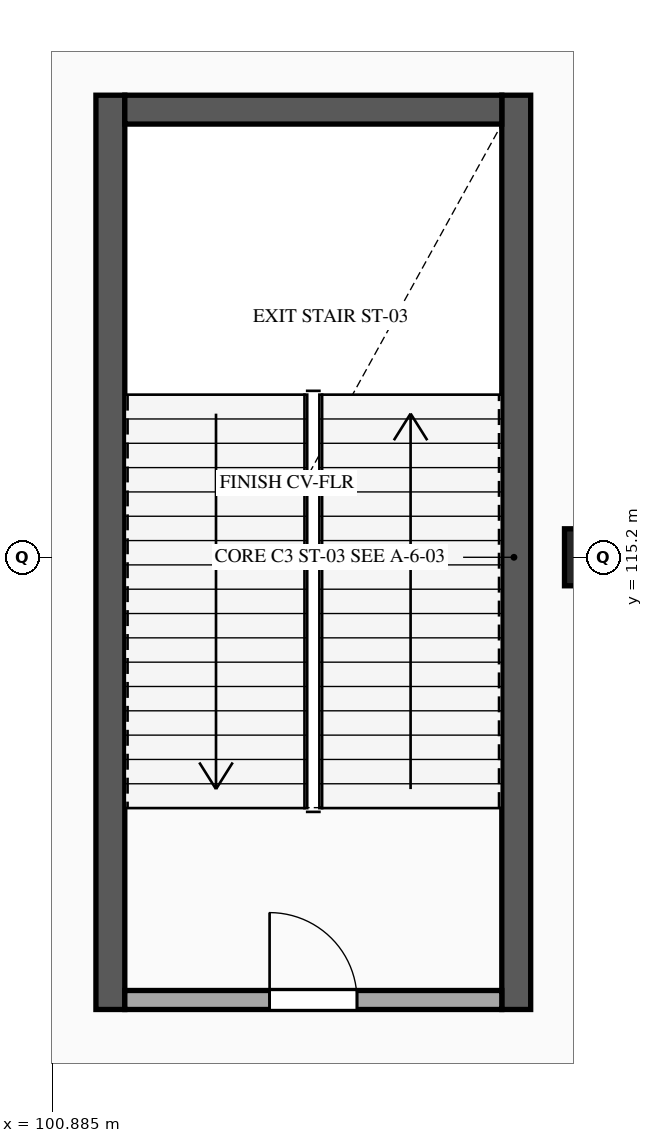
"""IFC4 building model, lengths in metres.
Left out: names, types, materials, properties, quantities, classifications, styles, units other than length and angle.
Written with IfcOpenShell. Run it as: python <this file> out.ifc"""

import sys

from ifc_helpers import new_model, si_unit, direction, frame, frame_2d, origin, origin_2d, place, context, subcontext, project, spatial, rectangle, extrude, element, fill, save


model = new_model("IFC4")
c1 = context("Model", 3, precision=1e-05, world=origin(), true_north=direction((0.0, 1.0)))
c2 = subcontext(c1, "Body", "Model", "MODEL_VIEW")
j1 = project(units=[si_unit("LENGTHUNIT", "METRE"), si_unit("PLANEANGLEUNIT", "RADIAN")], contexts=[c1])
p1 = place(None, origin())
s1 = spatial("IfcSite", under=j1, at=p1, CompositionType="ELEMENT")
p2 = place(p1, origin())
s2 = spatial("IfcBuilding", under=s1, at=p2, CompositionType="ELEMENT")
p3 = place(p2, frame((0.0, 0.0, 5.4)))
s3 = spatial("IfcBuildingStorey", under=s2, at=p3, CompositionType="ELEMENT", Elevation=5.4)
p4 = place(p3, frame((108.0, 115.2, 0.0), z_axis=(0.0, 0.0, 1.0), x_axis=(1.0, 0.0, 0.0)))
e1 = element("IfcColumn", 1, at=p4, inside=s3, PredefinedType="COLUMN", context=c2, shape_type="SweptSolid", body=[
    extrude(rectangle(XDim=0.75, YDim=0.75, at=origin_2d()), origin(), (0.0, 0.0, 1.0), 5.4),
])
for number, where, z_axis, x_axis in (
    (2, (101.65, 109.25, 0.0), (0.0, 0.0, 1.0), (0.0, 1.0, 0.0)),
    (3, (106.99, 121.28, 0.0), (0.0, 0.0, 1.0), (0.0, -1.0, 0.0)),
):
    element("IfcWall", number, at=place(p3, frame(where, z_axis=z_axis, x_axis=x_axis)), inside=s3, PredefinedType="SHEAR", context=c2, shape_type="SweptSolid", body=[
        extrude(rectangle(XDim=12.03, YDim=0.38, at=frame_2d((6.015, 0.0))), origin(), (0.0, 0.0, 1.0), 5.12),
    ])
p5 = place(p3, frame((101.84, 121.09, 0.0), z_axis=(0.0, 0.0, 1.0), x_axis=(1.0, 0.0, 0.0)))
e4 = element("IfcWall", 4, at=p5, inside=s3, PredefinedType="SHEAR", context=c2, shape_type="SweptSolid", body=[
    extrude(rectangle(XDim=4.96, YDim=0.38, at=frame_2d((2.48, 0.0))), origin(), (0.0, 0.0, 1.0), 5.12),
])
p6 = place(p3, frame((101.84, 109.375, 0.0), z_axis=(0.0, 0.0, 1.0), x_axis=(1.0, 0.0, 0.0)))
e5 = element("IfcWall", 5, at=p6, inside=s3, PredefinedType="STANDARD", context=c2, shape_type="SweptSolid", body=[
    extrude(rectangle(XDim=4.96, YDim=0.25, at=frame_2d((2.48, 0.0))), origin(), (0.0, 0.0, 1.0), 5.12),
])
p7 = place(p6, frame((1.905, 0.0, 0.0)))
e6 = element("IfcOpeningElement", 6, at=p7, cuts=e5, PredefinedType="OPENING", context=c2, shape_type="SweptSolid", body=[
    extrude(rectangle(XDim=1.15, YDim=2.2, at=frame_2d((0.575, 1.1))), frame((0.0, 0.135, 0.0), z_axis=(0.0, -1.0, 0.0), x_axis=(1.0, 0.0, 0.0)), (0.0, 0.0, 1.0), 0.27),
])
p8 = place(p7, origin())
e7 = element("IfcDoor", 7, at=p8, inside=s3, OperationType="SINGLE_SWING_LEFT", PredefinedType="DOOR", context=c2, shape_type="SweptSolid", body=[
    extrude(rectangle(XDim=1.15, YDim=2.2, at=frame_2d((0.575, 1.1))), frame((0.0, 0.025, 0.0), z_axis=(0.0, -1.0, 0.0), x_axis=(1.0, 0.0, 0.0)), (0.0, 0.0, 1.0), 0.05),
])
fill(e6, e7)
save(model, sys.argv[1])
